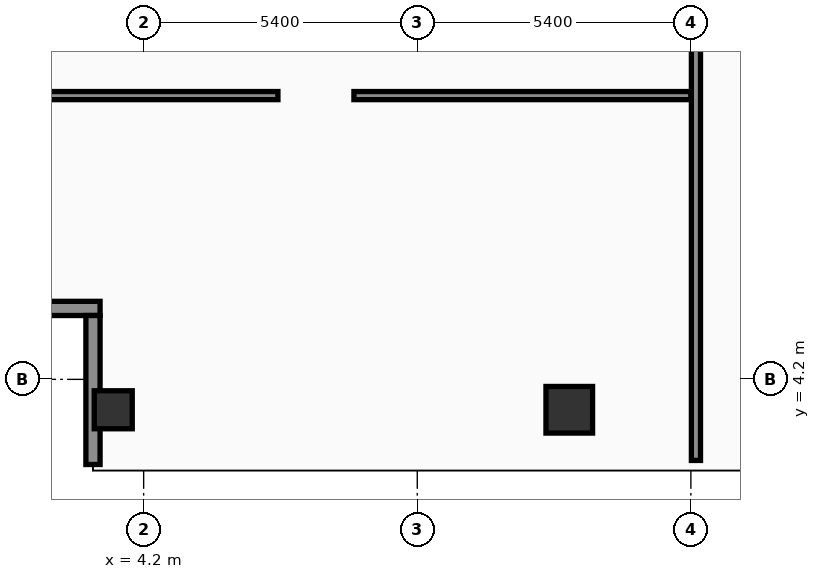
"""IFC4 building model, lengths in metres.
Left out: names, types, materials, properties, quantities, classifications, styles, units other than length and angle.
Written with IfcOpenShell. Run it as: python <this file> out.ifc"""

import sys

from ifc_helpers import new_model, si_unit, direction, frame, frame_2d, origin, origin_2d, place, context, subcontext, project, spatial, rectangle, hollow_rectangle, extrude, element, fill, save


model = new_model("IFC4")
c1 = context("Model", 3, precision=1e-05, world=origin(), true_north=direction((0.0, 1.0)))
c2 = subcontext(c1, "Body", "Model", "MODEL_VIEW")
j1 = project(units=[si_unit("LENGTHUNIT", "METRE"), si_unit("PLANEANGLEUNIT", "RADIAN")], contexts=[c1])
p1 = place(None, origin())
s1 = spatial("IfcSite", under=j1, at=p1, CompositionType="ELEMENT")
p2 = place(p1, origin())
s2 = spatial("IfcBuilding", under=s1, at=p2, CompositionType="ELEMENT")
p3 = place(p2, frame((0.0, 0.0, 311.5)))
s3 = spatial("IfcBuildingStorey", under=s2, at=p3, CompositionType="ELEMENT", Elevation=311.5)
p4 = place(p3, frame((3.6, 3.6, 0.0), z_axis=(0.0, 0.0, 1.0), x_axis=(1.0, 0.0, 0.0)))
e1 = element("IfcColumn", 1, at=p4, inside=s3, PredefinedType="COLUMN", context=c2, shape_type="SweptSolid", body=[
    extrude(hollow_rectangle(XDim=0.75, YDim=0.75, WallThickness=0.032, at=origin_2d()), origin(), (0.0, 0.0, 1.0), 4.26),
])
p5 = place(p3, frame((12.6, 3.6, 0.0), z_axis=(0.0, 0.0, 1.0), x_axis=(1.0, 0.0, 0.0)))
e2 = element("IfcColumn", 2, at=p5, inside=s3, PredefinedType="COLUMN", context=c2, shape_type="SweptSolid", body=[
    extrude(rectangle(XDim=0.92, YDim=0.92, at=origin_2d()), origin(), (0.0, 0.0, 1.0), 4.26),
])
p6 = place(p3, frame((0.12, 5.6, 0.0), z_axis=(0.0, 0.0, 1.0), x_axis=(1.0, 0.0, 0.0)))
e3 = element("IfcWall", 3, at=p6, inside=s3, PredefinedType="SOLIDWALL", context=c2, shape_type="SweptSolid", body=[
    extrude(rectangle(XDim=3.22, YDim=0.28, at=frame_2d((1.61, 0.0))), origin(), (0.0, 0.0, 1.0), 3.69),
])
p7 = place(p3, frame((3.2, 5.46, 0.0), z_axis=(0.0, 0.0, 1.0), x_axis=(0.0, -1.0, 0.0)))
e4 = element("IfcWall", 4, at=p7, inside=s3, PredefinedType="SOLIDWALL", context=c2, shape_type="SweptSolid", body=[
    extrude(rectangle(XDim=2.94, YDim=0.28, at=frame_2d((1.47, 0.0))), origin(), (0.0, 0.0, 1.0), 3.69),
])
p8 = place(p3, frame((0.35, 9.8, 0.0), z_axis=(0.0, 0.0, 1.0), x_axis=(1.0, 0.0, 0.0)))
e5 = element("IfcWall", 5, at=p8, inside=s3, PredefinedType="PARTITIONING", context=c2, shape_type="SweptSolid", body=[
    extrude(rectangle(XDim=14.65, YDim=0.16, at=frame_2d((7.325, 0.0))), origin(), (0.0, 0.0, 1.0), 3.69),
])
p9 = place(p8, frame((6.5, 0.0, 0.0)))
e6 = element("IfcOpeningElement", 6, at=p9, cuts=e5, PredefinedType="OPENING", context=c2, shape_type="SweptSolid", body=[
    extrude(rectangle(XDim=1.5, YDim=2.22, at=frame_2d((0.75, 1.11))), frame((0.0, 0.09, 0.0), z_axis=(0.0, -1.0, 0.0), x_axis=(1.0, 0.0, 0.0)), (0.0, 0.0, 1.0), 0.18),
])
p10 = place(p3, frame((15.1, 2.6, 0.0), z_axis=(0.0, 0.0, 1.0), x_axis=(0.0, 1.0, 0.0)))
e7 = element("IfcWall", 7, at=p10, inside=s3, PredefinedType="PARTITIONING", context=c2, shape_type="SweptSolid", body=[
    extrude(rectangle(XDim=14.0, YDim=0.18, at=frame_2d((7.0, 0.0))), origin(), (0.0, 0.0, 1.0), 3.29),
])
p11 = place(p10, frame((11.8, 0.0, 0.0)))
e8 = element("IfcOpeningElement", 8, at=p11, cuts=e7, PredefinedType="OPENING", context=c2, shape_type="SweptSolid", body=[
    extrude(rectangle(XDim=1.5, YDim=2.22, at=frame_2d((0.75, 1.11))), frame((0.0, 0.1, 0.0), z_axis=(0.0, -1.0, 0.0), x_axis=(1.0, 0.0, 0.0)), (0.0, 0.0, 1.0), 0.2),
])
p12 = place(p9, origin())
e9 = element("IfcDoor", 9, at=p12, inside=s3, OperationType="SINGLE_SWING_LEFT", PredefinedType="DOOR", context=c2, shape_type="SweptSolid", body=[
    extrude(rectangle(XDim=1.5, YDim=2.22, at=frame_2d((0.75, 1.11))), frame((0.0, 0.025, 0.0), z_axis=(0.0, -1.0, 0.0), x_axis=(1.0, 0.0, 0.0)), (0.0, 0.0, 1.0), 0.05),
])
fill(e6, e9)
save(model, sys.argv[1])
